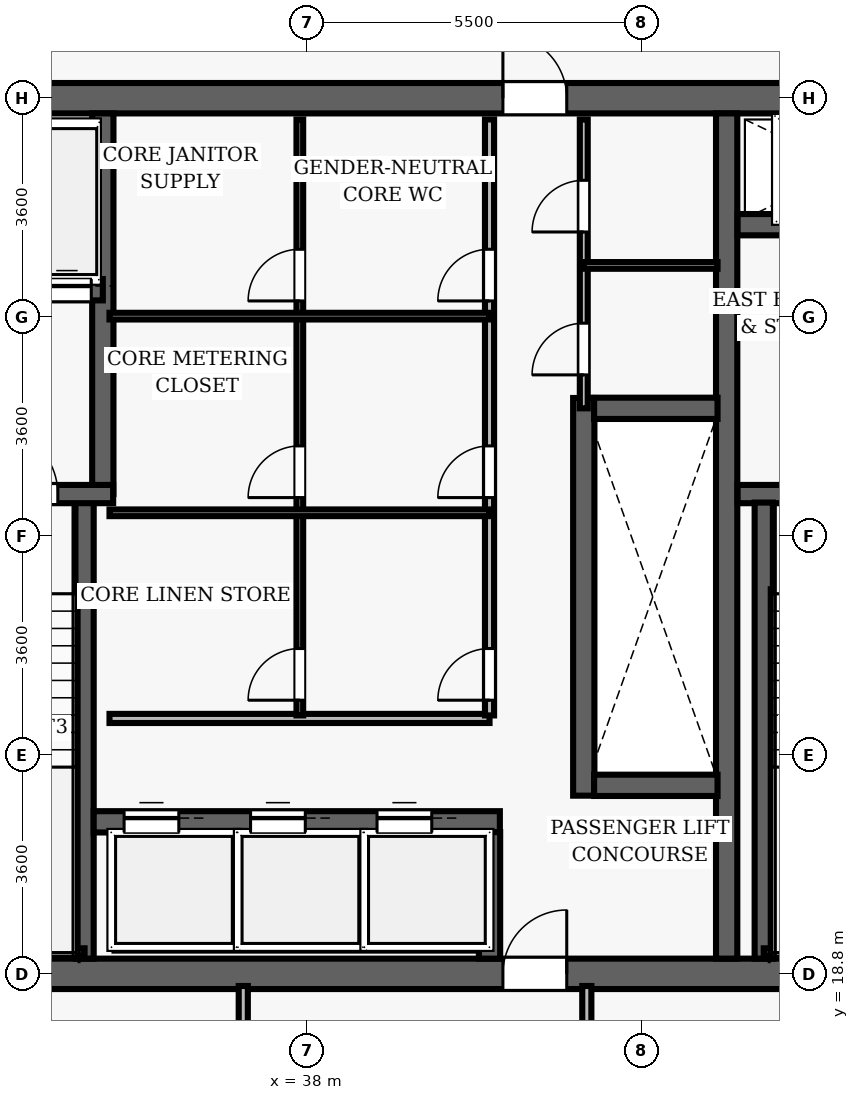
"""IFC4 building model, lengths in metres.
Left out: names, types, materials, properties, quantities, classifications, styles, units other than length and angle.
Written with IfcOpenShell. Run it as: python <this file> out.ifc"""

import sys

from ifc_helpers import new_model, si_unit, direction, frame, frame_2d, origin, place, context, subcontext, project, spatial, rectangle, extrude, element, fill, save


model = new_model("IFC4")
c1 = context("Model", 3, precision=1e-05, world=origin(), true_north=direction((0.0, 1.0)))
c2 = subcontext(c1, "Body", "Model", "MODEL_VIEW")
j1 = project(units=[si_unit("LENGTHUNIT", "METRE"), si_unit("PLANEANGLEUNIT", "RADIAN")], contexts=[c1])
p1 = place(None, origin())
s1 = spatial("IfcSite", under=j1, at=p1, CompositionType="ELEMENT")
p2 = place(p1, origin())
s2 = spatial("IfcBuilding", under=s1, at=p2, CompositionType="ELEMENT")
p3 = place(p2, frame((0.0, 0.0, 202.0)))
s3 = spatial("IfcBuildingStorey", under=s2, at=p3, CompositionType="ELEMENT", Elevation=202.0)
p4 = place(p3, frame((26.75, 18.8, 0.0), z_axis=(0.0, 0.0, 1.0), x_axis=(1.0, 0.0, 0.0)))
e1 = element("IfcWall", 1, at=p4, inside=s3, PredefinedType="SHEAR", context=c2, shape_type="SweptSolid", body=[
    extrude(rectangle(XDim=22.5, YDim=0.5, at=frame_2d((11.25, 0.0))), origin(), (0.0, 0.0, 1.0), 3.85),
])
p5 = place(p4, frame((14.47, 0.0, 0.0)))
e2 = element("IfcOpeningElement", 2, at=p5, cuts=e1, PredefinedType="OPENING", context=c2, shape_type="SweptSolid", body=[
    extrude(rectangle(XDim=1.05, YDim=2.15, at=frame_2d((0.525, 1.075))), frame((0.0, 0.26, 0.0), z_axis=(0.0, -1.0, 0.0), x_axis=(1.0, 0.0, 0.0)), (0.0, 0.0, 1.0), 0.52),
])
p6 = place(p3, frame((26.75, 33.2, 0.0), z_axis=(0.0, 0.0, 1.0), x_axis=(1.0, 0.0, 0.0)))
e3 = element("IfcWall", 3, at=p6, inside=s3, PredefinedType="SHEAR", context=c2, shape_type="SweptSolid", body=[
    extrude(rectangle(XDim=22.5, YDim=0.5, at=frame_2d((11.25, 0.0))), origin(), (0.0, 0.0, 1.0), 3.85),
])
p7 = place(p6, frame((4.57, 0.0, 0.0)))
e4 = element("IfcOpeningElement", 4, at=p7, cuts=e3, PredefinedType="OPENING", context=c2, shape_type="SweptSolid", body=[
    extrude(rectangle(XDim=1.05, YDim=2.15, at=frame_2d((0.525, 1.075))), frame((0.0, 0.26, 0.0), z_axis=(0.0, -1.0, 0.0), x_axis=(1.0, 0.0, 0.0)), (0.0, 0.0, 1.0), 0.52),
])
p8 = place(p6, frame((14.47, 0.0, 0.0)))
e5 = element("IfcOpeningElement", 5, at=p8, cuts=e3, PredefinedType="OPENING", context=c2, shape_type="SweptSolid", body=[
    extrude(rectangle(XDim=1.05, YDim=2.15, at=frame_2d((0.525, 1.075))), frame((0.0, 0.26, 0.0), z_axis=(0.0, -1.0, 0.0), x_axis=(1.0, 0.0, 0.0)), (0.0, 0.0, 1.0), 0.52),
])
p9 = place(p3, frame((44.9, 19.05, 0.0), z_axis=(0.0, 0.0, 1.0), x_axis=(0.0, 1.0, 0.0)))
e6 = element("IfcWall", 6, at=p9, inside=s3, PredefinedType="SHEAR", context=c2, shape_type="SweptSolid", body=[
    extrude(rectangle(XDim=13.9, YDim=0.35, at=frame_2d((6.95, 0.0))), origin(), (0.0, 0.0, 1.0), 3.85),
])
p10 = place(p3, frame((45.08, 26.69, 0.0), z_axis=(0.0, 0.0, 1.0), x_axis=(1.0, 0.0, 0.0)))
e7 = element("IfcWall", 7, at=p10, inside=s3, PredefinedType="SHEAR", context=c2, shape_type="SweptSolid", body=[
    extrude(rectangle(XDim=3.67, YDim=0.3, at=frame_2d((1.835, 0.0))), origin(), (0.0, 0.0, 1.0), 3.85),
])
p11 = place(p10, frame((1.05, 0.0, 0.0)))
e8 = element("IfcOpeningElement", 8, at=p11, cuts=e7, PredefinedType="OPENING", context=c2, shape_type="SweptSolid", body=[
    extrude(rectangle(XDim=1.1, YDim=2.15, at=frame_2d((0.55, 1.075))), frame((0.0, 0.16, 0.0), z_axis=(0.0, -1.0, 0.0), x_axis=(1.0, 0.0, 0.0)), (0.0, 0.0, 1.0), 0.32),
])
p12 = place(p3, frame((45.51, 19.05, 0.0), z_axis=(0.0, 0.0, 1.0), x_axis=(0.0, 1.0, 0.0)))
e9 = element("IfcWall", 9, at=p12, inside=s3, PredefinedType="SHEAR", context=c2, shape_type="SweptSolid", body=[
    extrude(rectangle(XDim=7.5, YDim=0.3, at=frame_2d((3.75, 0.0))), origin(), (0.0, 0.0, 1.0), 3.85),
])
p13 = place(p3, frame((45.51, 19.16, 0.0), z_axis=(0.0, 0.0, 1.0), x_axis=(1.0, 0.0, 0.0)))
e10 = element("IfcWall", 10, at=p13, inside=s3, PredefinedType="SHEAR", context=c2, shape_type="SweptSolid", body=[
    extrude(rectangle(XDim=3.095, YDim=0.12, at=frame_2d((1.547, 0.0))), origin(), (0.0, 0.0, 1.0), 3.85),
])
p14 = place(p3, frame((45.08, 31.12, 0.0), z_axis=(0.0, 0.0, 1.0), x_axis=(1.0, 0.0, 0.0)))
e11 = element("IfcWall", 11, at=p14, inside=s3, PredefinedType="SHEAR", context=c2, shape_type="SweptSolid", body=[
    extrude(rectangle(XDim=3.67, YDim=0.35, at=frame_2d((1.835, 0.0))), origin(), (0.0, 0.0, 1.0), 3.035),
])
p15 = place(p14, frame((1.25, 0.0, 0.0)))
e12 = element("IfcOpeningElement", 12, at=p15, cuts=e11, PredefinedType="OPENING", context=c2, shape_type="SweptSolid", body=[
    extrude(rectangle(XDim=1.1, YDim=2.15, at=frame_2d((0.55, 1.075))), frame((0.0, 0.185, 0.0), z_axis=(0.0, -1.0, 0.0), x_axis=(1.0, 0.0, 0.0)), (0.0, 0.0, 1.0), 0.37),
])
p16 = place(p3, frame((34.34, 19.05, 0.0), z_axis=(0.0, 0.0, 1.0), x_axis=(0.0, 1.0, 0.0)))
e13 = element("IfcWall", 13, at=p16, inside=s3, PredefinedType="SHEAR", context=c2, shape_type="SweptSolid", body=[
    extrude(rectangle(XDim=7.5, YDim=0.3, at=frame_2d((3.75, 0.0))), origin(), (0.0, 0.0, 1.0), 3.85),
])
p17 = place(p3, frame((34.64, 26.69, 0.0), z_axis=(0.0, 0.0, 1.0), x_axis=(0.0, 1.0, 0.0)))
e14 = element("IfcWall", 14, at=p17, inside=s3, PredefinedType="SHEAR", context=c2, shape_type="SweptSolid", body=[
    extrude(rectangle(XDim=6.26, YDim=0.35, at=frame_2d((3.13, 0.0))), origin(), (0.0, 0.0, 1.0), 3.85),
])
p18 = place(p3, frame((31.25, 26.69, 0.0), z_axis=(0.0, 0.0, 1.0), x_axis=(1.0, 0.0, 0.0)))
e15 = element("IfcWall", 15, at=p18, inside=s3, PredefinedType="SHEAR", context=c2, shape_type="SweptSolid", body=[
    extrude(rectangle(XDim=3.56, YDim=0.3, at=frame_2d((1.78, 0.0))), origin(), (0.0, 0.0, 1.0), 3.85),
])
p19 = place(p18, frame((1.55, 0.0, 0.0)))
e16 = element("IfcOpeningElement", 16, at=p19, cuts=e15, PredefinedType="OPENING", context=c2, shape_type="SweptSolid", body=[
    extrude(rectangle(XDim=1.1, YDim=2.15, at=frame_2d((0.55, 1.075))), frame((0.0, 0.16, 0.0), z_axis=(0.0, -1.0, 0.0), x_axis=(1.0, 0.0, 0.0)), (0.0, 0.0, 1.0), 0.32),
])
p20 = place(p3, frame((31.3, 19.16, 0.0), z_axis=(0.0, 0.0, 1.0), x_axis=(1.0, 0.0, 0.0)))
e17 = element("IfcWall", 17, at=p20, inside=s3, PredefinedType="SHEAR", context=c2, shape_type="SweptSolid", body=[
    extrude(rectangle(XDim=3.04, YDim=0.12, at=frame_2d((1.52, 0.0))), origin(), (0.0, 0.0, 1.0), 3.85),
])
p21 = place(p3, frame((32.23, 30.05, 0.0), z_axis=(0.0, 0.0, 1.0), x_axis=(1.0, 0.0, 0.0)))
e18 = element("IfcWall", 18, at=p21, inside=s3, PredefinedType="SHEAR", context=c2, shape_type="SweptSolid", body=[
    extrude(rectangle(XDim=2.41, YDim=0.35, at=frame_2d((1.205, 0.0))), origin(), (0.0, 0.0, 1.0), 3.035),
])
p22 = place(p21, frame((0.42, 0.0, 0.0)))
e19 = element("IfcOpeningElement", 19, at=p22, cuts=e18, PredefinedType="OPENING", context=c2, shape_type="SweptSolid", body=[
    extrude(rectangle(XDim=0.8, YDim=2.15, at=frame_2d((0.4, 1.075))), frame((0.0, 0.185, 0.0), z_axis=(0.0, -1.0, 0.0), x_axis=(1.0, 0.0, 0.0)), (0.0, 0.0, 1.0), 0.37),
])
p23 = place(p21, frame((1.42, 0.0, 0.0)))
e20 = element("IfcOpeningElement", 20, at=p23, cuts=e18, PredefinedType="OPENING", context=c2, shape_type="SweptSolid", body=[
    extrude(rectangle(XDim=0.8, YDim=2.15, at=frame_2d((0.4, 1.075))), frame((0.0, 0.185, 0.0), z_axis=(0.0, -1.0, 0.0), x_axis=(1.0, 0.0, 0.0)), (0.0, 0.0, 1.0), 0.37),
])
p24 = place(p3, frame((42.55, 21.73, 0.0), z_axis=(0.0, 0.0, 1.0), x_axis=(0.0, 1.0, 0.0)))
e21 = element("IfcWall", 21, at=p24, inside=s3, PredefinedType="SHEAR", context=c2, shape_type="SweptSolid", body=[
    extrude(rectangle(XDim=6.54, YDim=0.35, at=frame_2d((3.27, 0.0))), origin(), (0.0, 0.0, 1.0), 3.035),
])
for number, where, z_axis, x_axis in (
    (22, (42.72, 21.9, 0.0), (0.0, 0.0, 1.0), (1.0, 0.0, 0.0)),
    (23, (42.72, 28.1, 0.0), (0.0, 0.0, 1.0), (1.0, 0.0, 0.0)),
):
    element("IfcWall", number, at=place(p3, frame(where, z_axis=z_axis, x_axis=x_axis)), inside=s3, PredefinedType="SHEAR", context=c2, shape_type="SweptSolid", body=[
        extrude(rectangle(XDim=2.03, YDim=0.35, at=frame_2d((1.015, 0.0))), origin(), (0.0, 0.0, 1.0), 3.035),
    ])
p25 = place(p3, frame((34.49, 21.3, 0.0), z_axis=(0.0, 0.0, 1.0), x_axis=(1.0, 0.0, 0.0)))
e24 = element("IfcWall", 24, at=p25, inside=s3, PredefinedType="SHEAR", context=c2, shape_type="SweptSolid", body=[
    extrude(rectangle(XDim=6.68, YDim=0.35, at=frame_2d((3.34, 0.0))), origin(), (0.0, 0.0, 1.0), 3.035),
])
p26 = place(p25, frame((0.5, 0.0, 0.0)))
e25 = element("IfcOpeningElement", 25, at=p26, cuts=e24, PredefinedType="OPENING", context=c2, shape_type="SweptSolid", body=[
    extrude(rectangle(XDim=0.9, YDim=2.15, at=frame_2d((0.45, 1.075))), frame((0.0, 0.185, 0.0), z_axis=(0.0, -1.0, 0.0), x_axis=(1.0, 0.0, 0.0)), (0.0, 0.0, 1.0), 0.37),
])
p27 = place(p25, frame((2.58, 0.0, 0.0)))
e26 = element("IfcOpeningElement", 26, at=p27, cuts=e24, PredefinedType="OPENING", context=c2, shape_type="SweptSolid", body=[
    extrude(rectangle(XDim=0.9, YDim=2.15, at=frame_2d((0.45, 1.075))), frame((0.0, 0.185, 0.0), z_axis=(0.0, -1.0, 0.0), x_axis=(1.0, 0.0, 0.0)), (0.0, 0.0, 1.0), 0.37),
])
p28 = place(p25, frame((4.66, 0.0, 0.0)))
e27 = element("IfcOpeningElement", 27, at=p28, cuts=e24, PredefinedType="OPENING", context=c2, shape_type="SweptSolid", body=[
    extrude(rectangle(XDim=0.9, YDim=2.15, at=frame_2d((0.45, 1.075))), frame((0.0, 0.185, 0.0), z_axis=(0.0, -1.0, 0.0), x_axis=(1.0, 0.0, 0.0)), (0.0, 0.0, 1.0), 0.37),
])
p29 = place(p3, frame((41.0, 19.05, 0.0), z_axis=(0.0, 0.0, 1.0), x_axis=(0.0, 1.0, 0.0)))
e28 = element("IfcWall", 28, at=p29, inside=s3, PredefinedType="SHEAR", context=c2, shape_type="SweptSolid", body=[
    extrude(rectangle(XDim=2.08, YDim=0.35, at=frame_2d((1.04, 0.0))), origin(), (0.0, 0.0, 1.0), 3.035),
])
p30 = place(p3, frame((34.75, 23.0, 0.0), z_axis=(0.0, 0.0, 1.0), x_axis=(1.0, 0.0, 0.0)))
e29 = element("IfcWall", 29, at=p30, inside=s3, PredefinedType="PARTITIONING", context=c2, shape_type="SweptSolid", body=[
    extrude(rectangle(XDim=6.25, YDim=0.15, at=frame_2d((3.125, 0.0))), origin(), (0.0, 0.0, 1.0), 3.035),
])
p31 = place(p3, frame((41.0, 23.05, 0.0), z_axis=(0.0, 0.0, 1.0), x_axis=(0.0, 1.0, 0.0)))
e30 = element("IfcWall", 30, at=p31, inside=s3, PredefinedType="PARTITIONING", context=c2, shape_type="SweptSolid", body=[
    extrude(rectangle(XDim=9.8, YDim=0.15, at=frame_2d((4.9, 0.0))), origin(), (0.0, 0.0, 1.0), 3.035),
])
p32 = place(p31, frame((0.25, 0.0, 0.0)))
e31 = element("IfcOpeningElement", 31, at=p32, cuts=e30, PredefinedType="OPENING", context=c2, shape_type="SweptSolid", body=[
    extrude(rectangle(XDim=0.85, YDim=2.1, at=frame_2d((0.425, 1.05))), frame((0.0, 0.085, 0.0), z_axis=(0.0, -1.0, 0.0), x_axis=(1.0, 0.0, 0.0)), (0.0, 0.0, 1.0), 0.17),
])
p33 = place(p31, frame((3.582, 0.0, 0.0)))
e32 = element("IfcOpeningElement", 32, at=p33, cuts=e30, PredefinedType="OPENING", context=c2, shape_type="SweptSolid", body=[
    extrude(rectangle(XDim=0.85, YDim=2.1, at=frame_2d((0.425, 1.05))), frame((0.0, 0.085, 0.0), z_axis=(0.0, -1.0, 0.0), x_axis=(1.0, 0.0, 0.0)), (0.0, 0.0, 1.0), 0.17),
])
p34 = place(p31, frame((6.816, 0.0, 0.0)))
e33 = element("IfcOpeningElement", 33, at=p34, cuts=e30, PredefinedType="OPENING", context=c2, shape_type="SweptSolid", body=[
    extrude(rectangle(XDim=0.85, YDim=2.1, at=frame_2d((0.425, 1.05))), frame((0.0, 0.085, 0.0), z_axis=(0.0, -1.0, 0.0), x_axis=(1.0, 0.0, 0.0)), (0.0, 0.0, 1.0), 0.17),
])
p35 = place(p3, frame((37.88, 23.05, 0.0), z_axis=(0.0, 0.0, 1.0), x_axis=(0.0, 1.0, 0.0)))
e34 = element("IfcWall", 34, at=p35, inside=s3, PredefinedType="PARTITIONING", context=c2, shape_type="SweptSolid", body=[
    extrude(rectangle(XDim=9.8, YDim=0.11, at=frame_2d((4.9, 0.0))), origin(), (0.0, 0.0, 1.0), 3.035),
])
p36 = place(p35, frame((0.25, 0.0, 0.0)))
e35 = element("IfcOpeningElement", 35, at=p36, cuts=e34, PredefinedType="OPENING", context=c2, shape_type="SweptSolid", body=[
    extrude(rectangle(XDim=0.85, YDim=2.1, at=frame_2d((0.425, 1.05))), frame((0.0, 0.065, 0.0), z_axis=(0.0, -1.0, 0.0), x_axis=(1.0, 0.0, 0.0)), (0.0, 0.0, 1.0), 0.13),
])
p37 = place(p35, frame((3.582, 0.0, 0.0)))
e36 = element("IfcOpeningElement", 36, at=p37, cuts=e34, PredefinedType="OPENING", context=c2, shape_type="SweptSolid", body=[
    extrude(rectangle(XDim=0.85, YDim=2.1, at=frame_2d((0.425, 1.05))), frame((0.0, 0.065, 0.0), z_axis=(0.0, -1.0, 0.0), x_axis=(1.0, 0.0, 0.0)), (0.0, 0.0, 1.0), 0.13),
])
p38 = place(p35, frame((6.816, 0.0, 0.0)))
e37 = element("IfcOpeningElement", 37, at=p38, cuts=e34, PredefinedType="OPENING", context=c2, shape_type="SweptSolid", body=[
    extrude(rectangle(XDim=0.85, YDim=2.1, at=frame_2d((0.425, 1.05))), frame((0.0, 0.065, 0.0), z_axis=(0.0, -1.0, 0.0), x_axis=(1.0, 0.0, 0.0)), (0.0, 0.0, 1.0), 0.13),
])
for number, where, z_axis, x_axis in (
    (38, (34.75, 26.382, 0.0), (0.0, 0.0, 1.0), (1.0, 0.0, 0.0)),
    (39, (34.75, 29.616, 0.0), (0.0, 0.0, 1.0), (1.0, 0.0, 0.0)),
):
    element("IfcWall", number, at=place(p3, frame(where, z_axis=z_axis, x_axis=x_axis)), inside=s3, PredefinedType="PARTITIONING", context=c2, shape_type="SweptSolid", body=[
        extrude(rectangle(XDim=6.25, YDim=0.11, at=frame_2d((3.125, 0.0))), origin(), (0.0, 0.0, 1.0), 3.035),
    ])
p39 = place(p3, frame((42.55, 28.1, 0.0), z_axis=(0.0, 0.0, 1.0), x_axis=(0.0, 1.0, 0.0)))
e40 = element("IfcWall", 40, at=p39, inside=s3, PredefinedType="PARTITIONING", context=c2, shape_type="SweptSolid", body=[
    extrude(rectangle(XDim=4.75, YDim=0.13, at=frame_2d((2.375, 0.0))), origin(), (0.0, 0.0, 1.0), 3.035),
])
p40 = place(p39, frame((0.55, 0.0, 0.0)))
e41 = element("IfcOpeningElement", 41, at=p40, cuts=e40, PredefinedType="OPENING", context=c2, shape_type="SweptSolid", body=[
    extrude(rectangle(XDim=0.85, YDim=2.1, at=frame_2d((0.425, 1.05))), frame((0.0, 0.075, 0.0), z_axis=(0.0, -1.0, 0.0), x_axis=(1.0, 0.0, 0.0)), (0.0, 0.0, 1.0), 0.15),
])
p41 = place(p39, frame((2.9, 0.0, 0.0)))
e42 = element("IfcOpeningElement", 42, at=p41, cuts=e40, PredefinedType="OPENING", context=c2, shape_type="SweptSolid", body=[
    extrude(rectangle(XDim=0.85, YDim=2.1, at=frame_2d((0.425, 1.05))), frame((0.0, 0.075, 0.0), z_axis=(0.0, -1.0, 0.0), x_axis=(1.0, 0.0, 0.0)), (0.0, 0.0, 1.0), 0.15),
])
p42 = place(p3, frame((42.55, 30.45, 0.0), z_axis=(0.0, 0.0, 1.0), x_axis=(1.0, 0.0, 0.0)))
e43 = element("IfcWall", 43, at=p42, inside=s3, PredefinedType="PARTITIONING", context=c2, shape_type="SweptSolid", body=[
    extrude(rectangle(XDim=2.2, YDim=0.11, at=frame_2d((1.1, 0.0))), origin(), (0.0, 0.0, 1.0), 3.035),
])
p43 = place(p3, frame((36.95, 11.2, 0.0), z_axis=(0.0, 0.0, 1.0), x_axis=(0.0, 1.0, 0.0)))
e44 = element("IfcWall", 44, at=p43, inside=s3, PredefinedType="PARTITIONING", context=c2, shape_type="SweptSolid", body=[
    extrude(rectangle(XDim=7.4, YDim=0.15, at=frame_2d((3.7, 0.0))), origin(), (0.0, 0.0, 1.0), 3.035),
])
p44 = place(p43, frame((5.075, 0.0, 0.0)))
e45 = element("IfcOpeningElement", 45, at=p44, cuts=e44, PredefinedType="OPENING", context=c2, shape_type="SweptSolid", body=[
    extrude(rectangle(XDim=0.95, YDim=2.15, at=frame_2d((0.475, 1.075))), frame((0.0, 0.085, 0.0), z_axis=(0.0, -1.0, 0.0), x_axis=(1.0, 0.0, 0.0)), (0.0, 0.0, 1.0), 0.17),
])
p45 = place(p3, frame((42.6, 16.65, 0.0), z_axis=(0.0, 0.0, 1.0), x_axis=(0.0, 1.0, 0.0)))
e46 = element("IfcWall", 46, at=p45, inside=s3, PredefinedType="PARTITIONING", context=c2, shape_type="SweptSolid", body=[
    extrude(rectangle(XDim=1.95, YDim=0.15, at=frame_2d((0.975, 0.0))), origin(), (0.0, 0.0, 1.0), 3.035),
])
p46 = place(p19, origin())
e47 = element("IfcDoor", 47, at=p46, inside=s3, OperationType="SINGLE_SWING_LEFT", PredefinedType="DOOR", context=c2, shape_type="SweptSolid", body=[
    extrude(rectangle(XDim=1.1, YDim=2.15, at=frame_2d((0.55, 1.075))), frame((0.0, 0.025, 0.0), z_axis=(0.0, -1.0, 0.0), x_axis=(1.0, 0.0, 0.0)), (0.0, 0.0, 1.0), 0.05),
])
fill(e16, e47)
p47 = place(p8, origin())
e48 = element("IfcDoor", 48, at=p47, inside=s3, OperationType="SINGLE_SWING_LEFT", PredefinedType="DOOR", context=c2, shape_type="SweptSolid", body=[
    extrude(rectangle(XDim=1.05, YDim=2.15, at=frame_2d((0.525, 1.075))), frame((0.0, 0.025, 0.0), z_axis=(0.0, -1.0, 0.0), x_axis=(1.0, 0.0, 0.0)), (0.0, 0.0, 1.0), 0.05),
])
fill(e5, e48)
p48 = place(p5, origin())
e49 = element("IfcDoor", 49, at=p48, inside=s3, OperationType="SINGLE_SWING_RIGHT", PredefinedType="DOOR", context=c2, shape_type="SweptSolid", body=[
    extrude(rectangle(XDim=1.05, YDim=2.15, at=frame_2d((0.525, 1.075))), frame((0.0, 0.025, 0.0), z_axis=(0.0, -1.0, 0.0), x_axis=(1.0, 0.0, 0.0)), (0.0, 0.0, 1.0), 0.05),
])
fill(e2, e49)
p49 = place(p32, origin())
e50 = element("IfcDoor", 50, at=p49, inside=s3, OperationType="SINGLE_SWING_LEFT", PredefinedType="DOOR", context=c2, shape_type="SweptSolid", body=[
    extrude(rectangle(XDim=0.85, YDim=2.1, at=frame_2d((0.425, 1.05))), frame((0.0, 0.025, 0.0), z_axis=(0.0, -1.0, 0.0), x_axis=(1.0, 0.0, 0.0)), (0.0, 0.0, 1.0), 0.05),
])
fill(e31, e50)
p50 = place(p36, origin())
e51 = element("IfcDoor", 51, at=p50, inside=s3, OperationType="SINGLE_SWING_LEFT", PredefinedType="DOOR", context=c2, shape_type="SweptSolid", body=[
    extrude(rectangle(XDim=0.85, YDim=2.1, at=frame_2d((0.425, 1.05))), frame((0.0, 0.025, 0.0), z_axis=(0.0, -1.0, 0.0), x_axis=(1.0, 0.0, 0.0)), (0.0, 0.0, 1.0), 0.05),
])
fill(e35, e51)
p51 = place(p33, origin())
e52 = element("IfcDoor", 52, at=p51, inside=s3, OperationType="SINGLE_SWING_LEFT", PredefinedType="DOOR", context=c2, shape_type="SweptSolid", body=[
    extrude(rectangle(XDim=0.85, YDim=2.1, at=frame_2d((0.425, 1.05))), frame((0.0, 0.025, 0.0), z_axis=(0.0, -1.0, 0.0), x_axis=(1.0, 0.0, 0.0)), (0.0, 0.0, 1.0), 0.05),
])
fill(e32, e52)
p52 = place(p37, origin())
e53 = element("IfcDoor", 53, at=p52, inside=s3, OperationType="SINGLE_SWING_LEFT", PredefinedType="DOOR", context=c2, shape_type="SweptSolid", body=[
    extrude(rectangle(XDim=0.85, YDim=2.1, at=frame_2d((0.425, 1.05))), frame((0.0, 0.025, 0.0), z_axis=(0.0, -1.0, 0.0), x_axis=(1.0, 0.0, 0.0)), (0.0, 0.0, 1.0), 0.05),
])
fill(e36, e53)
p53 = place(p34, origin())
e54 = element("IfcDoor", 54, at=p53, inside=s3, OperationType="SINGLE_SWING_LEFT", PredefinedType="DOOR", context=c2, shape_type="SweptSolid", body=[
    extrude(rectangle(XDim=0.85, YDim=2.1, at=frame_2d((0.425, 1.05))), frame((0.0, 0.025, 0.0), z_axis=(0.0, -1.0, 0.0), x_axis=(1.0, 0.0, 0.0)), (0.0, 0.0, 1.0), 0.05),
])
fill(e33, e54)
p54 = place(p38, origin())
e55 = element("IfcDoor", 55, at=p54, inside=s3, OperationType="SINGLE_SWING_LEFT", PredefinedType="DOOR", context=c2, shape_type="SweptSolid", body=[
    extrude(rectangle(XDim=0.85, YDim=2.1, at=frame_2d((0.425, 1.05))), frame((0.0, 0.025, 0.0), z_axis=(0.0, -1.0, 0.0), x_axis=(1.0, 0.0, 0.0)), (0.0, 0.0, 1.0), 0.05),
])
fill(e37, e55)
p55 = place(p40, origin())
e56 = element("IfcDoor", 56, at=p55, inside=s3, OperationType="SINGLE_SWING_LEFT", PredefinedType="DOOR", context=c2, shape_type="SweptSolid", body=[
    extrude(rectangle(XDim=0.85, YDim=2.1, at=frame_2d((0.425, 1.05))), frame((0.0, 0.025, 0.0), z_axis=(0.0, -1.0, 0.0), x_axis=(1.0, 0.0, 0.0)), (0.0, 0.0, 1.0), 0.05),
])
fill(e41, e56)
p56 = place(p41, origin())
e57 = element("IfcDoor", 57, at=p56, inside=s3, OperationType="SINGLE_SWING_LEFT", PredefinedType="DOOR", context=c2, shape_type="SweptSolid", body=[
    extrude(rectangle(XDim=0.85, YDim=2.1, at=frame_2d((0.425, 1.05))), frame((0.0, 0.025, 0.0), z_axis=(0.0, -1.0, 0.0), x_axis=(1.0, 0.0, 0.0)), (0.0, 0.0, 1.0), 0.05),
])
fill(e42, e57)
p57 = place(p26, origin())
e58 = element("IfcDoor", 58, at=p57, inside=s3, OperationType="SLIDING_TO_LEFT", PredefinedType="DOOR", context=c2, shape_type="SweptSolid", body=[
    extrude(rectangle(XDim=0.9, YDim=2.15, at=frame_2d((0.45, 1.075))), frame((0.0, 0.025, 0.0), z_axis=(0.0, -1.0, 0.0), x_axis=(1.0, 0.0, 0.0)), (0.0, 0.0, 1.0), 0.05),
])
fill(e25, e58)
p58 = place(p27, origin())
e59 = element("IfcDoor", 59, at=p58, inside=s3, OperationType="SLIDING_TO_LEFT", PredefinedType="DOOR", context=c2, shape_type="SweptSolid", body=[
    extrude(rectangle(XDim=0.9, YDim=2.15, at=frame_2d((0.45, 1.075))), frame((0.0, 0.025, 0.0), z_axis=(0.0, -1.0, 0.0), x_axis=(1.0, 0.0, 0.0)), (0.0, 0.0, 1.0), 0.05),
])
fill(e26, e59)
p59 = place(p28, origin())
e60 = element("IfcDoor", 60, at=p59, inside=s3, OperationType="SLIDING_TO_LEFT", PredefinedType="DOOR", context=c2, shape_type="SweptSolid", body=[
    extrude(rectangle(XDim=0.9, YDim=2.15, at=frame_2d((0.45, 1.075))), frame((0.0, 0.025, 0.0), z_axis=(0.0, -1.0, 0.0), x_axis=(1.0, 0.0, 0.0)), (0.0, 0.0, 1.0), 0.05),
])
fill(e27, e60)
p60 = place(p23, origin())
e61 = element("IfcDoor", 61, at=p60, inside=s3, OperationType="SLIDING_TO_LEFT", PredefinedType="DOOR", context=c2, shape_type="SweptSolid", body=[
    extrude(rectangle(XDim=0.8, YDim=2.15, at=frame_2d((0.4, 1.075))), frame((0.0, 0.025, 0.0), z_axis=(0.0, -1.0, 0.0), x_axis=(1.0, 0.0, 0.0)), (0.0, 0.0, 1.0), 0.05),
])
fill(e20, e61)
save(model, sys.argv[1])
